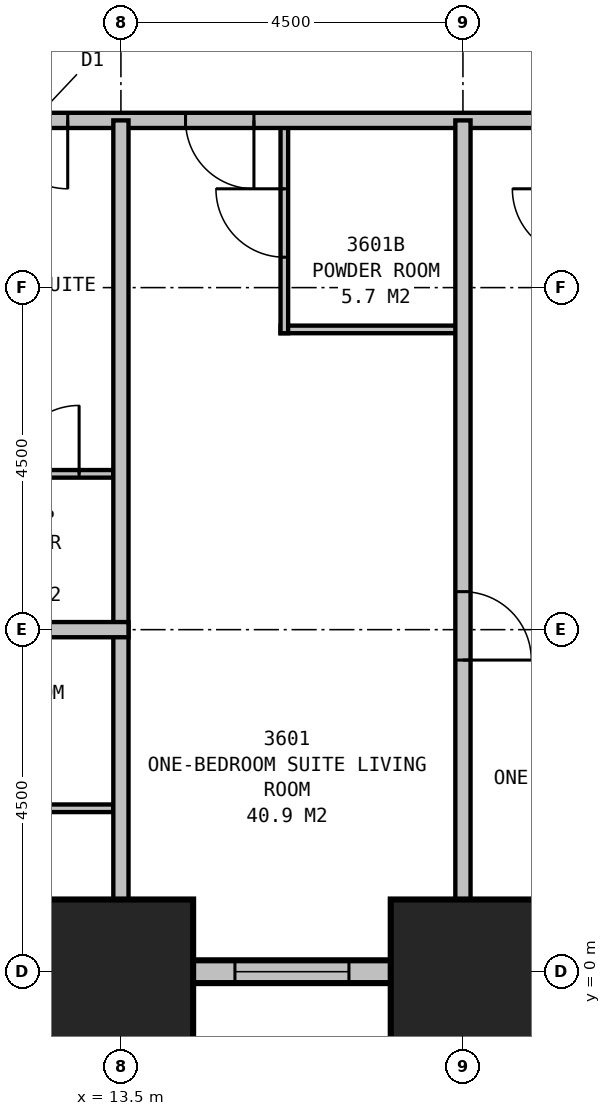
"""IFC4 building model, lengths in metres.
Left out: names, types, materials, properties, quantities, classifications, styles, units other than length and angle.
Written with IfcOpenShell. Run it as: python <this file> out.ifc"""

import sys

from ifc_helpers import new_model, si_unit, direction, frame, frame_2d, origin, origin_2d, place, context, subcontext, project, spatial, rectangle, extrude, element, fill, save


model = new_model("IFC4")
c1 = context("Model", 3, precision=1e-05, world=origin(), true_north=direction((0.0, 1.0)))
c2 = subcontext(c1, "Body", "Model", "MODEL_VIEW")
j1 = project(units=[si_unit("LENGTHUNIT", "METRE"), si_unit("PLANEANGLEUNIT", "RADIAN")], contexts=[c1])
p1 = place(None, origin())
s1 = spatial("IfcSite", under=j1, at=p1, CompositionType="ELEMENT")
p2 = place(p1, origin())
s2 = spatial("IfcBuilding", under=s1, at=p2, CompositionType="ELEMENT")
p3 = place(p2, frame((0.0, 0.0, 138.9)))
s3 = spatial("IfcBuildingStorey", under=s2, at=p3, CompositionType="ELEMENT", Elevation=138.9)
for number, where, z_axis, x_axis in (
    (1, (13.5, 0.0, 0.0), (0.0, 0.0, 1.0), (1.0, 0.0, 0.0)),
    (2, (18.0, 0.0, 0.0), (0.0, 0.0, 1.0), (1.0, 0.0, 0.0)),
):
    element("IfcColumn", number, at=place(p3, frame(where, z_axis=z_axis, x_axis=x_axis)), inside=s3, PredefinedType="COLUMN", context=c2, shape_type="SweptSolid", body=[
        extrude(rectangle(XDim=1.9, YDim=1.9, at=origin_2d()), origin(), (0.0, 0.0, 1.0), 3.5),
    ])
p4 = place(p3, frame((4.35, 0.0, 0.0), z_axis=(0.0, 0.0, 1.0), x_axis=(1.0, 0.0, 0.0)))
e3 = element("IfcWall", 3, at=p4, inside=s3, PredefinedType="STANDARD", context=c2, shape_type="SweptSolid", body=[
    extrude(rectangle(XDim=40.8, YDim=0.3, at=frame_2d((20.4, 0.0))), origin(), (0.0, 0.0, 1.0), 2.15),
])
p5 = place(p4, frame((1.65, 0.0, 0.5)))
e4 = element("IfcOpeningElement", 4, at=p5, cuts=e3, PredefinedType="OPENING", context=c2, shape_type="SweptSolid", body=[
    extrude(rectangle(XDim=1.5, YDim=1.5, at=frame_2d((0.75, 0.75))), frame((0.0, 0.16, 0.0), z_axis=(0.0, -1.0, 0.0), x_axis=(1.0, 0.0, 0.0)), (0.0, 0.0, 1.0), 0.32),
])
p6 = place(p4, frame((6.15, 0.0, 0.5)))
e5 = element("IfcOpeningElement", 5, at=p6, cuts=e3, PredefinedType="OPENING", context=c2, shape_type="SweptSolid", body=[
    extrude(rectangle(XDim=1.5, YDim=1.5, at=frame_2d((0.75, 0.75))), frame((0.0, 0.16, 0.0), z_axis=(0.0, -1.0, 0.0), x_axis=(1.0, 0.0, 0.0)), (0.0, 0.0, 1.0), 0.32),
])
p7 = place(p4, frame((10.65, 0.0, 0.5)))
e6 = element("IfcOpeningElement", 6, at=p7, cuts=e3, PredefinedType="OPENING", context=c2, shape_type="SweptSolid", body=[
    extrude(rectangle(XDim=1.5, YDim=1.5, at=frame_2d((0.75, 0.75))), frame((0.0, 0.16, 0.0), z_axis=(0.0, -1.0, 0.0), x_axis=(1.0, 0.0, 0.0)), (0.0, 0.0, 1.0), 0.32),
])
p8 = place(p4, frame((15.15, 0.0, 0.5)))
e7 = element("IfcOpeningElement", 7, at=p8, cuts=e3, PredefinedType="OPENING", context=c2, shape_type="SweptSolid", body=[
    extrude(rectangle(XDim=1.5, YDim=1.5, at=frame_2d((0.75, 0.75))), frame((0.0, 0.16, 0.0), z_axis=(0.0, -1.0, 0.0), x_axis=(1.0, 0.0, 0.0)), (0.0, 0.0, 1.0), 0.32),
])
p9 = place(p4, frame((19.65, 0.0, 0.5)))
e8 = element("IfcOpeningElement", 8, at=p9, cuts=e3, PredefinedType="OPENING", context=c2, shape_type="SweptSolid", body=[
    extrude(rectangle(XDim=1.5, YDim=1.5, at=frame_2d((0.75, 0.75))), frame((0.0, 0.16, 0.0), z_axis=(0.0, -1.0, 0.0), x_axis=(1.0, 0.0, 0.0)), (0.0, 0.0, 1.0), 0.32),
])
p10 = place(p4, frame((24.15, 0.0, 0.5)))
e9 = element("IfcOpeningElement", 9, at=p10, cuts=e3, PredefinedType="OPENING", context=c2, shape_type="SweptSolid", body=[
    extrude(rectangle(XDim=1.5, YDim=1.5, at=frame_2d((0.75, 0.75))), frame((0.0, 0.16, 0.0), z_axis=(0.0, -1.0, 0.0), x_axis=(1.0, 0.0, 0.0)), (0.0, 0.0, 1.0), 0.32),
])
p11 = place(p4, frame((28.65, 0.0, 0.5)))
e10 = element("IfcOpeningElement", 10, at=p11, cuts=e3, PredefinedType="OPENING", context=c2, shape_type="SweptSolid", body=[
    extrude(rectangle(XDim=1.5, YDim=1.5, at=frame_2d((0.75, 0.75))), frame((0.0, 0.16, 0.0), z_axis=(0.0, -1.0, 0.0), x_axis=(1.0, 0.0, 0.0)), (0.0, 0.0, 1.0), 0.32),
])
p12 = place(p4, frame((33.15, 0.0, 0.5)))
e11 = element("IfcOpeningElement", 11, at=p12, cuts=e3, PredefinedType="OPENING", context=c2, shape_type="SweptSolid", body=[
    extrude(rectangle(XDim=1.5, YDim=1.5, at=frame_2d((0.75, 0.75))), frame((0.0, 0.16, 0.0), z_axis=(0.0, -1.0, 0.0), x_axis=(1.0, 0.0, 0.0)), (0.0, 0.0, 1.0), 0.32),
])
p13 = place(p4, frame((37.65, 0.0, 0.5)))
e12 = element("IfcOpeningElement", 12, at=p13, cuts=e3, PredefinedType="OPENING", context=c2, shape_type="SweptSolid", body=[
    extrude(rectangle(XDim=1.5, YDim=1.5, at=frame_2d((0.75, 0.75))), frame((0.0, 0.16, 0.0), z_axis=(0.0, -1.0, 0.0), x_axis=(1.0, 0.0, 0.0)), (0.0, 0.0, 1.0), 0.32),
])
p14 = place(p3, frame((11.2, 11.2, 0.0), z_axis=(0.0, 0.0, 1.0), x_axis=(1.0, 0.0, 0.0)))
e13 = element("IfcWall", 13, at=p14, inside=s3, PredefinedType="PARTITIONING", context=c2, shape_type="SweptSolid", body=[
    extrude(rectangle(XDim=27.1, YDim=0.2, at=frame_2d((13.55, 0.0))), origin(), (0.0, 0.0, 1.0), 3.25),
])
p15 = place(p14, frame((4.05, 0.0, 0.0), z_axis=(0.0, 0.0, 1.0), x_axis=(-1.0, 0.0, 0.0)))
e14 = element("IfcOpeningElement", 14, at=p15, cuts=e13, PredefinedType="OPENING", context=c2, shape_type="SweptSolid", body=[
    extrude(rectangle(XDim=0.9, YDim=2.1, at=frame_2d((0.45, 1.05))), frame((0.0, 0.11, 0.0), z_axis=(0.0, -1.0, 0.0), x_axis=(1.0, 0.0, 0.0)), (0.0, 0.0, 1.0), 0.22),
])
p16 = place(p14, frame((12.65, 0.0, 0.0), z_axis=(0.0, 0.0, 1.0), x_axis=(-1.0, 0.0, 0.0)))
e15 = element("IfcOpeningElement", 15, at=p16, cuts=e13, PredefinedType="OPENING", context=c2, shape_type="SweptSolid", body=[
    extrude(rectangle(XDim=1.0, YDim=2.1, at=frame_2d((0.5, 1.05))), frame((0.0, 0.11, 0.0), z_axis=(0.0, -1.0, 0.0), x_axis=(1.0, 0.0, 0.0)), (0.0, 0.0, 1.0), 0.22),
])
p17 = place(p14, frame((19.45, 0.0, 0.0), z_axis=(0.0, 0.0, 1.0), x_axis=(-1.0, 0.0, 0.0)))
e16 = element("IfcOpeningElement", 16, at=p17, cuts=e13, PredefinedType="OPENING", context=c2, shape_type="SweptSolid", body=[
    extrude(rectangle(XDim=0.9, YDim=2.1, at=frame_2d((0.45, 1.05))), frame((0.0, 0.11, 0.0), z_axis=(0.0, -1.0, 0.0), x_axis=(1.0, 0.0, 0.0)), (0.0, 0.0, 1.0), 0.22),
])
p18 = place(p14, frame((1.6, 0.0, 0.0), z_axis=(0.0, 0.0, 1.0), x_axis=(-1.0, 0.0, 0.0)))
e17 = element("IfcOpeningElement", 17, at=p18, cuts=e13, PredefinedType="OPENING", context=c2, shape_type="SweptSolid", body=[
    extrude(rectangle(XDim=0.9, YDim=2.1, at=frame_2d((0.45, 1.05))), frame((0.0, 0.11, 0.0), z_axis=(0.0, -1.0, 0.0), x_axis=(1.0, 0.0, 0.0)), (0.0, 0.0, 1.0), 0.22),
])
p19 = place(p14, frame((26.4, 0.0, 0.0), z_axis=(0.0, 0.0, 1.0), x_axis=(-1.0, 0.0, 0.0)))
e18 = element("IfcOpeningElement", 18, at=p19, cuts=e13, PredefinedType="OPENING", context=c2, shape_type="SweptSolid", body=[
    extrude(rectangle(XDim=0.9, YDim=2.1, at=frame_2d((0.45, 1.05))), frame((0.0, 0.11, 0.0), z_axis=(0.0, -1.0, 0.0), x_axis=(1.0, 0.0, 0.0)), (0.0, 0.0, 1.0), 0.22),
])
p20 = place(p3, frame((18.0, 11.2, 0.0), z_axis=(0.0, 0.0, 1.0), x_axis=(0.0, -1.0, 0.0)))
e19 = element("IfcWall", 19, at=p20, inside=s3, PredefinedType="PARTITIONING", context=c2, shape_type="SweptSolid", body=[
    extrude(rectangle(XDim=11.2, YDim=0.2, at=frame_2d((5.6, 0.0))), origin(), (0.0, 0.0, 1.0), 2.25),
])
p21 = place(p20, frame((6.2, 0.0, 0.0)))
e20 = element("IfcOpeningElement", 20, at=p21, cuts=e19, PredefinedType="OPENING", context=c2, shape_type="SweptSolid", body=[
    extrude(rectangle(XDim=0.9, YDim=2.1, at=frame_2d((0.45, 1.05))), frame((0.0, 0.11, 0.0), z_axis=(0.0, -1.0, 0.0), x_axis=(1.0, 0.0, 0.0)), (0.0, 0.0, 1.0), 0.22),
])
p22 = place(p3, frame((15.6, 8.45, 0.0), z_axis=(0.0, 0.0, 1.0), x_axis=(1.0, 0.0, 0.0)))
e21 = element("IfcWall", 21, at=p22, inside=s3, PredefinedType="PLUMBINGWALL", context=c2, shape_type="SweptSolid", body=[
    extrude(rectangle(XDim=2.4, YDim=0.1, at=frame_2d((1.2, 0.0))), origin(), (0.0, 0.0, 1.0), 3.25),
])
p23 = place(p3, frame((15.65, 11.2, 0.0), z_axis=(0.0, 0.0, 1.0), x_axis=(0.0, -1.0, 0.0)))
e22 = element("IfcWall", 22, at=p23, inside=s3, PredefinedType="PLUMBINGWALL", context=c2, shape_type="SweptSolid", body=[
    extrude(rectangle(XDim=2.8, YDim=0.1, at=frame_2d((1.4, 0.0))), origin(), (0.0, 0.0, 1.0), 3.25),
])
p24 = place(p23, frame((1.8, 0.0, 0.0), z_axis=(0.0, 0.0, 1.0), x_axis=(-1.0, 0.0, 0.0)))
e23 = element("IfcOpeningElement", 23, at=p24, cuts=e22, PredefinedType="OPENING", context=c2, shape_type="SweptSolid", body=[
    extrude(rectangle(XDim=0.9, YDim=2.1, at=frame_2d((0.45, 1.05))), frame((0.0, 0.06, 0.0), z_axis=(0.0, -1.0, 0.0), x_axis=(1.0, 0.0, 0.0)), (0.0, 0.0, 1.0), 0.12),
])
p25 = place(p3, frame((13.5, 11.2, 0.0), z_axis=(0.0, 0.0, 1.0), x_axis=(0.0, -1.0, 0.0)))
e24 = element("IfcWall", 24, at=p25, inside=s3, PredefinedType="PARTITIONING", context=c2, shape_type="SweptSolid", body=[
    extrude(rectangle(XDim=11.2, YDim=0.2, at=frame_2d((5.6, 0.0))), origin(), (0.0, 0.0, 1.0), 2.25),
])
p26 = place(p3, frame((13.6, 4.5, 0.0), z_axis=(0.0, 0.0, 1.0), x_axis=(-1.0, 0.0, 0.0)))
e25 = element("IfcWall", 25, at=p26, inside=s3, PredefinedType="PARTITIONING", context=c2, shape_type="SweptSolid", body=[
    extrude(rectangle(XDim=9.1, YDim=0.2, at=frame_2d((4.55, 0.0))), origin(), (0.0, 0.0, 1.0), 3.25),
])
p27 = place(p26, frame((7.1, 0.0, 0.0)))
e26 = element("IfcOpeningElement", 26, at=p27, cuts=e25, PredefinedType="OPENING", context=c2, shape_type="SweptSolid", body=[
    extrude(rectangle(XDim=0.9, YDim=2.1, at=frame_2d((0.45, 1.05))), frame((0.0, 0.11, 0.0), z_axis=(0.0, -1.0, 0.0), x_axis=(1.0, 0.0, 0.0)), (0.0, 0.0, 1.0), 0.22),
])
p28 = place(p3, frame((13.4, 6.55, 0.0), z_axis=(0.0, 0.0, 1.0), x_axis=(-1.0, 0.0, 0.0)))
e27 = element("IfcWall", 27, at=p28, inside=s3, PredefinedType="PLUMBINGWALL", context=c2, shape_type="SweptSolid", body=[
    extrude(rectangle(XDim=1.8, YDim=0.1, at=frame_2d((0.9, 0.0))), origin(), (0.0, 0.0, 1.0), 3.25),
])
p29 = place(p28, frame((1.35, 0.0, 0.0), z_axis=(0.0, 0.0, 1.0), x_axis=(-1.0, 0.0, 0.0)))
e28 = element("IfcOpeningElement", 28, at=p29, cuts=e27, PredefinedType="OPENING", context=c2, shape_type="SweptSolid", body=[
    extrude(rectangle(XDim=0.9, YDim=2.1, at=frame_2d((0.45, 1.05))), frame((0.0, 0.06, 0.0), z_axis=(0.0, -1.0, 0.0), x_axis=(1.0, 0.0, 0.0)), (0.0, 0.0, 1.0), 0.12),
])
p30 = place(p3, frame((13.4, 2.15, 0.0), z_axis=(0.0, 0.0, 1.0), x_axis=(-1.0, 0.0, 0.0)))
e29 = element("IfcWall", 29, at=p30, inside=s3, PredefinedType="PLUMBINGWALL", context=c2, shape_type="SweptSolid", body=[
    extrude(rectangle(XDim=3.5, YDim=0.1, at=frame_2d((1.75, 0.0))), origin(), (0.0, 0.0, 1.0), 3.25),
])
p31 = place(p30, frame((0.9, 0.0, 0.0)))
e30 = element("IfcOpeningElement", 30, at=p31, cuts=e29, PredefinedType="OPENING", context=c2, shape_type="SweptSolid", body=[
    extrude(rectangle(XDim=0.9, YDim=2.1, at=frame_2d((0.45, 1.05))), frame((0.0, 0.06, 0.0), z_axis=(0.0, -1.0, 0.0), x_axis=(1.0, 0.0, 0.0)), (0.0, 0.0, 1.0), 0.12),
])
p32 = place(p7, origin())
e31 = element("IfcWindow", 31, at=p32, inside=s3, PartitioningType="SINGLE_PANEL", PredefinedType="WINDOW", context=c2, shape_type="SweptSolid", body=[
    extrude(rectangle(XDim=1.5, YDim=1.5, at=frame_2d((0.75, 0.75))), frame((0.0, 0.03, 0.0), z_axis=(0.0, -1.0, 0.0), x_axis=(1.0, 0.0, 0.0)), (0.0, 0.0, 1.0), 0.06),
])
fill(e6, e31)
p33 = place(p15, origin())
e32 = element("IfcDoor", 32, at=p33, inside=s3, OperationType="SINGLE_SWING_LEFT", PredefinedType="DOOR", context=c2, shape_type="SweptSolid", body=[
    extrude(rectangle(XDim=0.9, YDim=2.1, at=frame_2d((0.45, 1.05))), frame((0.0, 0.025, 0.0), z_axis=(0.0, -1.0, 0.0), x_axis=(1.0, 0.0, 0.0)), (0.0, 0.0, 1.0), 0.05),
])
fill(e14, e32)
p34 = place(p18, origin())
e33 = element("IfcDoor", 33, at=p34, inside=s3, OperationType="SINGLE_SWING_LEFT", PredefinedType="DOOR", context=c2, shape_type="SweptSolid", body=[
    extrude(rectangle(XDim=0.9, YDim=2.1, at=frame_2d((0.45, 1.05))), frame((0.0, 0.025, 0.0), z_axis=(0.0, -1.0, 0.0), x_axis=(1.0, 0.0, 0.0)), (0.0, 0.0, 1.0), 0.05),
])
fill(e17, e33)
p35 = place(p21, origin())
e34 = element("IfcDoor", 34, at=p35, inside=s3, OperationType="SINGLE_SWING_RIGHT", PredefinedType="DOOR", context=c2, shape_type="SweptSolid", body=[
    extrude(rectangle(XDim=0.9, YDim=2.1, at=frame_2d((0.45, 1.05))), frame((0.0, 0.025, 0.0), z_axis=(0.0, -1.0, 0.0), x_axis=(1.0, 0.0, 0.0)), (0.0, 0.0, 1.0), 0.05),
])
fill(e20, e34)
p36 = place(p24, origin())
e35 = element("IfcDoor", 35, at=p36, inside=s3, OperationType="SINGLE_SWING_RIGHT", PredefinedType="DOOR", context=c2, shape_type="SweptSolid", body=[
    extrude(rectangle(XDim=0.9, YDim=2.1, at=frame_2d((0.45, 1.05))), frame((0.0, 0.025, 0.0), z_axis=(0.0, -1.0, 0.0), x_axis=(1.0, 0.0, 0.0)), (0.0, 0.0, 1.0), 0.05),
])
fill(e23, e35)
p37 = place(p29, origin())
e36 = element("IfcDoor", 36, at=p37, inside=s3, OperationType="SINGLE_SWING_RIGHT", PredefinedType="DOOR", context=c2, shape_type="SweptSolid", body=[
    extrude(rectangle(XDim=0.9, YDim=2.1, at=frame_2d((0.45, 1.05))), frame((0.0, 0.025, 0.0), z_axis=(0.0, -1.0, 0.0), x_axis=(1.0, 0.0, 0.0)), (0.0, 0.0, 1.0), 0.05),
])
fill(e28, e36)
save(model, sys.argv[1])
